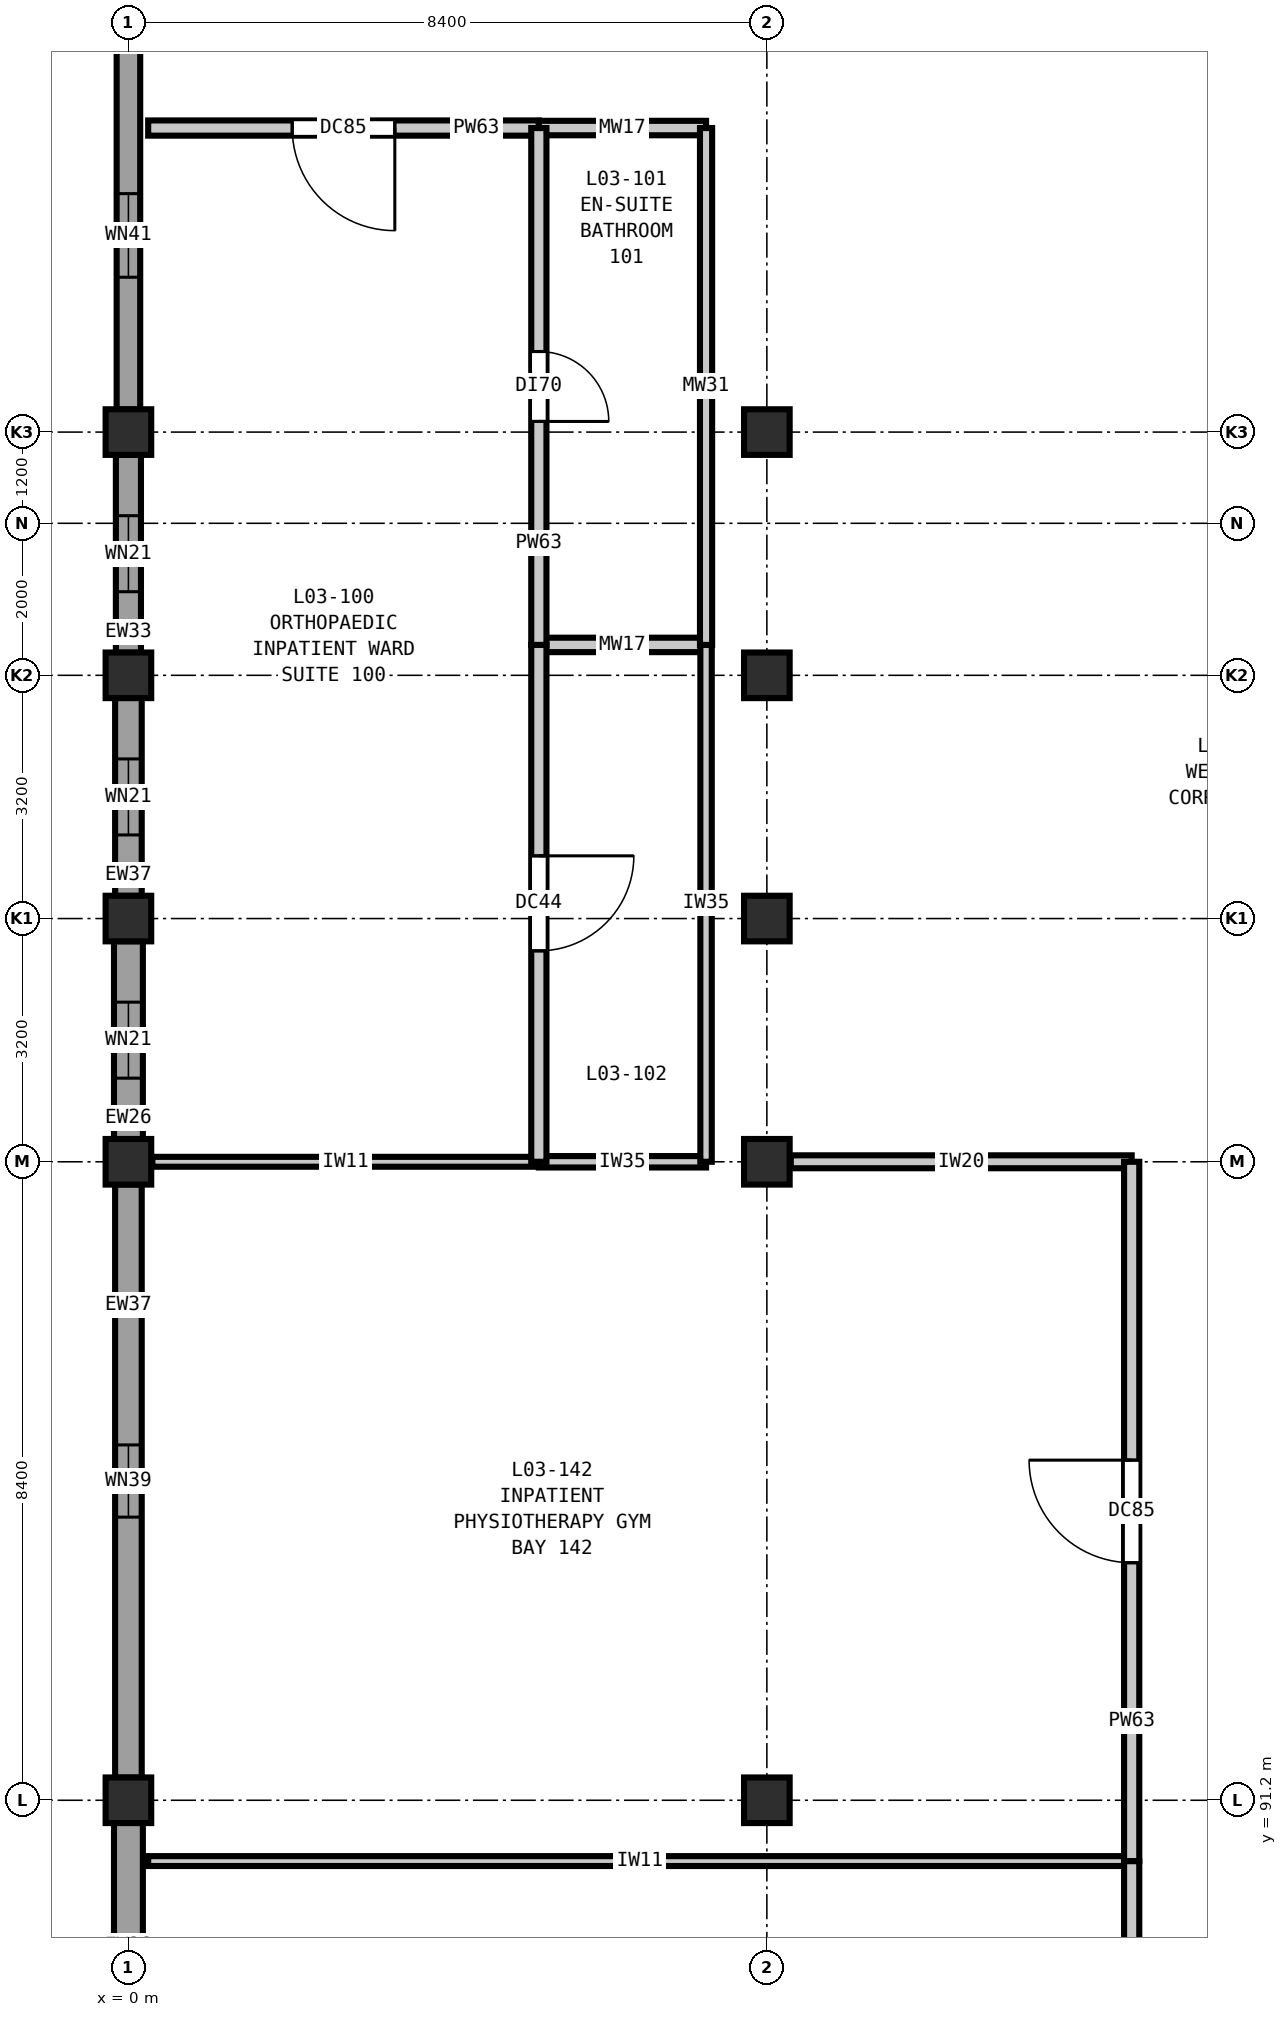
"""IFC4 building model, lengths in metres.
Left out: names, types, materials, properties, quantities, classifications, styles, units other than length and angle.
Written with IfcOpenShell. Run it as: python <this file> out.ifc"""

import sys

from ifc_helpers import new_model, si_unit, direction, frame, frame_2d, origin, origin_2d, place, context, subcontext, project, spatial, rectangle, extrude, element, fill, save


model = new_model("IFC4")
c1 = context("Model", 3, precision=1e-05, world=origin(), true_north=direction((0.0, 1.0)))
c2 = subcontext(c1, "Body", "Model", "MODEL_VIEW")
j1 = project(units=[si_unit("LENGTHUNIT", "METRE"), si_unit("PLANEANGLEUNIT", "RADIAN")], contexts=[c1])
p1 = place(None, origin())
s1 = spatial("IfcSite", under=j1, at=p1, CompositionType="ELEMENT")
p2 = place(p1, origin())
s2 = spatial("IfcBuilding", under=s1, at=p2, CompositionType="ELEMENT")
p3 = place(p2, frame((0.0, 0.0, 16.2)))
s3 = spatial("IfcBuildingStorey", under=s2, at=p3, CompositionType="ELEMENT", Elevation=16.2)
for number, where, z_axis, x_axis in (
    (1, (0.0, 91.2, 0.0), (0.0, 0.0, 1.0), (1.0, 0.0, 0.0)),
    (2, (0.0, 99.6, 0.0), (0.0, 0.0, 1.0), (1.0, 0.0, 0.0)),
    (3, (0.0, 102.8, 0.0), (0.0, 0.0, 1.0), (1.0, 0.0, 0.0)),
    (4, (0.0, 106.0, 0.0), (0.0, 0.0, 1.0), (1.0, 0.0, 0.0)),
    (5, (0.0, 109.2, 0.0), (0.0, 0.0, 1.0), (1.0, 0.0, 0.0)),
    (6, (8.4, 91.2, 0.0), (0.0, 0.0, 1.0), (1.0, 0.0, 0.0)),
    (7, (8.4, 99.6, 0.0), (0.0, 0.0, 1.0), (1.0, 0.0, 0.0)),
    (8, (8.4, 102.8, 0.0), (0.0, 0.0, 1.0), (1.0, 0.0, 0.0)),
    (9, (8.4, 106.0, 0.0), (0.0, 0.0, 1.0), (1.0, 0.0, 0.0)),
    (10, (8.4, 109.2, 0.0), (0.0, 0.0, 1.0), (1.0, 0.0, 0.0)),
):
    element("IfcColumn", number, at=place(p3, frame(where, z_axis=z_axis, x_axis=x_axis)), inside=s3, PredefinedType="COLUMN", context=c2, shape_type="SweptSolid", body=[
        extrude(rectangle(XDim=0.6, YDim=0.6, at=origin_2d()), origin(), (0.0, 0.0, 1.0), 4.2),
    ])
p4 = place(p3, frame((0.0, 99.898, 0.0), z_axis=(0.0, 0.0, 1.0), x_axis=(0.0, 1.0, 0.0)))
e11 = element("IfcWall", 11, at=p4, inside=s3, PredefinedType="SOLIDWALL", context=c2, shape_type="SweptSolid", body=[
    extrude(rectangle(XDim=2.604, YDim=0.38, at=frame_2d((1.302, 0.0))), origin(), (0.0, 0.0, 1.0), 3.48),
])
p5 = place(p4, frame((0.802, 0.0, 0.9)))
e12 = element("IfcOpeningElement", 12, at=p5, cuts=e11, PredefinedType="OPENING", context=c2, shape_type="SweptSolid", body=[
    extrude(rectangle(XDim=1.0, YDim=1.55, at=frame_2d((0.5, 0.775))), frame((0.0, 0.2, 0.0), z_axis=(0.0, -1.0, 0.0), x_axis=(1.0, 0.0, 0.0)), (0.0, 0.0, 1.0), 0.4),
])
p6 = place(p3, frame((0.0, 103.098, 0.0), z_axis=(0.0, 0.0, 1.0), x_axis=(0.0, 1.0, 0.0)))
e13 = element("IfcWall", 13, at=p6, inside=s3, PredefinedType="SOLIDWALL", context=c2, shape_type="SweptSolid", body=[
    extrude(rectangle(XDim=2.604, YDim=0.35, at=frame_2d((1.302, 0.0))), origin(), (0.0, 0.0, 1.0), 3.48),
])
p7 = place(p6, frame((0.802, 0.0, 0.9)))
e14 = element("IfcOpeningElement", 14, at=p7, cuts=e13, PredefinedType="OPENING", context=c2, shape_type="SweptSolid", body=[
    extrude(rectangle(XDim=1.0, YDim=1.55, at=frame_2d((0.5, 0.775))), frame((0.0, 0.185, 0.0), z_axis=(0.0, -1.0, 0.0), x_axis=(1.0, 0.0, 0.0)), (0.0, 0.0, 1.0), 0.37),
])
p8 = place(p3, frame((0.0, 106.298, 0.0), z_axis=(0.0, 0.0, 1.0), x_axis=(0.0, 1.0, 0.0)))
e15 = element("IfcWall", 15, at=p8, inside=s3, PredefinedType="SOLIDWALL", context=c2, shape_type="SweptSolid", body=[
    extrude(rectangle(XDim=2.604, YDim=0.33, at=frame_2d((1.302, 0.0))), origin(), (0.0, 0.0, 1.0), 3.48),
])
p9 = place(p8, frame((0.802, 0.0, 0.9)))
e16 = element("IfcOpeningElement", 16, at=p9, cuts=e15, PredefinedType="OPENING", context=c2, shape_type="SweptSolid", body=[
    extrude(rectangle(XDim=1.0, YDim=1.55, at=frame_2d((0.5, 0.775))), frame((0.0, 0.175, 0.0), z_axis=(0.0, -1.0, 0.0), x_axis=(1.0, 0.0, 0.0)), (0.0, 0.0, 1.0), 0.35),
])
p10 = place(p3, frame((0.0, 109.498, 0.0), z_axis=(0.0, 0.0, 1.0), x_axis=(0.0, 1.0, 0.0)))
e17 = element("IfcWall", 17, at=p10, inside=s3, PredefinedType="SOLIDWALL", context=c2, shape_type="SweptSolid", body=[
    extrude(rectangle(XDim=6.604, YDim=0.31, at=frame_2d((3.302, 0.0))), origin(), (0.0, 0.0, 1.0), 3.48),
])
p11 = place(p10, frame((1.739, 0.0, 0.9)))
e18 = element("IfcOpeningElement", 18, at=p11, cuts=e17, PredefinedType="OPENING", context=c2, shape_type="SweptSolid", body=[
    extrude(rectangle(XDim=1.1, YDim=1.95, at=frame_2d((0.55, 0.975))), frame((0.0, 0.165, 0.0), z_axis=(0.0, -1.0, 0.0), x_axis=(1.0, 0.0, 0.0)), (0.0, 0.0, 1.0), 0.33),
])
p12 = place(p3, frame((0.0, 83.073, 0.0), z_axis=(0.0, 0.0, 1.0), x_axis=(0.0, 1.0, 0.0)))
e19 = element("IfcWall", 19, at=p12, inside=s3, PredefinedType="SOLIDWALL", context=c2, shape_type="SweptSolid", body=[
    extrude(rectangle(XDim=7.829, YDim=0.38, at=frame_2d((3.915, 0.0))), origin(), (0.0, 0.0, 1.0), 3.48),
])
p13 = place(p12, frame((3.49, 0.0, 0.9)))
e20 = element("IfcOpeningElement", 20, at=p13, cuts=e19, PredefinedType="OPENING", context=c2, shape_type="SweptSolid", body=[
    extrude(rectangle(XDim=0.85, YDim=1.4, at=frame_2d((0.425, 0.7))), frame((0.0, 0.2, 0.0), z_axis=(0.0, -1.0, 0.0), x_axis=(1.0, 0.0, 0.0)), (0.0, 0.0, 1.0), 0.4),
])
p14 = place(p3, frame((0.0, 91.498, 0.0), z_axis=(0.0, 0.0, 1.0), x_axis=(0.0, 1.0, 0.0)))
e21 = element("IfcWall", 21, at=p14, inside=s3, PredefinedType="SOLIDWALL", context=c2, shape_type="SweptSolid", body=[
    extrude(rectangle(XDim=7.804, YDim=0.35, at=frame_2d((3.902, 0.0))), origin(), (0.0, 0.0, 1.0), 3.48),
])
p15 = place(p14, frame((3.427, 0.0, 0.9)))
e22 = element("IfcOpeningElement", 22, at=p15, cuts=e21, PredefinedType="OPENING", context=c2, shape_type="SweptSolid", body=[
    extrude(rectangle(XDim=0.95, YDim=1.4, at=frame_2d((0.475, 0.7))), frame((0.0, 0.185, 0.0), z_axis=(0.0, -1.0, 0.0), x_axis=(1.0, 0.0, 0.0)), (0.0, 0.0, 1.0), 0.37),
])
p16 = place(p3, frame((0.26, 90.4, 0.0), z_axis=(0.0, 0.0, 1.0), x_axis=(1.0, 0.0, 0.0)))
e23 = element("IfcWall", 23, at=p16, inside=s3, PredefinedType="PARTITIONING", context=c2, shape_type="SweptSolid", body=[
    extrude(rectangle(XDim=12.94, YDim=0.13, at=frame_2d((6.47, 0.0))), origin(), (0.0, 0.0, 1.0), 3.89),
])
p17 = place(p3, frame((0.315, 99.6, 0.0), z_axis=(0.0, 0.0, 1.0), x_axis=(1.0, 0.0, 0.0)))
e24 = element("IfcWall", 24, at=p17, inside=s3, PredefinedType="PARTITIONING", context=c2, shape_type="SweptSolid", body=[
    extrude(rectangle(XDim=5.085, YDim=0.13, at=frame_2d((2.542, 0.0))), origin(), (0.0, 0.0, 1.0), 3.535),
])
p18 = place(p3, frame((5.4, 99.6, 0.0), z_axis=(0.0, 0.0, 1.0), x_axis=(1.0, 0.0, 0.0)))
e25 = element("IfcWall", 25, at=p18, inside=s3, PredefinedType="PARTITIONING", context=c2, shape_type="SweptSolid", body=[
    extrude(rectangle(XDim=2.2, YDim=0.15, at=frame_2d((1.1, 0.0))), origin(), (0.0, 0.0, 1.0), 3.535),
])
p19 = place(p3, frame((8.715, 99.6, 0.0), z_axis=(0.0, 0.0, 1.0), x_axis=(1.0, 0.0, 0.0)))
e26 = element("IfcWall", 26, at=p19, inside=s3, PredefinedType="PARTITIONING", context=c2, shape_type="SweptSolid", body=[
    extrude(rectangle(XDim=4.485, YDim=0.17, at=frame_2d((2.242, 0.0))), origin(), (0.0, 0.0, 1.0), 3.535),
])
p20 = place(p3, frame((5.4, 106.4, 0.0), z_axis=(0.0, 0.0, 1.0), x_axis=(1.0, 0.0, 0.0)))
e27 = element("IfcWall", 27, at=p20, inside=s3, PredefinedType="PLUMBINGWALL", context=c2, shape_type="SweptSolid", body=[
    extrude(rectangle(XDim=2.2, YDim=0.19, at=frame_2d((1.1, 0.0))), origin(), (0.0, 0.0, 1.0), 3.89),
])
p21 = place(p3, frame((0.26, 113.2, 0.0), z_axis=(0.0, 0.0, 1.0), x_axis=(1.0, 0.0, 0.0)))
e28 = element("IfcWall", 28, at=p21, inside=s3, PredefinedType="PARTITIONING", context=c2, shape_type="SweptSolid", body=[
    extrude(rectangle(XDim=5.14, YDim=0.2, at=frame_2d((2.57, 0.0))), origin(), (0.0, 0.0, 1.0), 3.89),
])
p22 = place(p21, frame((1.895, 0.0, 0.0)))
e29 = element("IfcOpeningElement", 29, at=p22, cuts=e28, PredefinedType="OPENING", context=c2, shape_type="SweptSolid", body=[
    extrude(rectangle(XDim=1.35, YDim=2.2, at=frame_2d((0.675, 1.1))), frame((0.0, 0.11, 0.0), z_axis=(0.0, -1.0, 0.0), x_axis=(1.0, 0.0, 0.0)), (0.0, 0.0, 1.0), 0.22),
])
p23 = place(p3, frame((5.4, 113.2, 0.0), z_axis=(0.0, 0.0, 1.0), x_axis=(1.0, 0.0, 0.0)))
e30 = element("IfcWall", 30, at=p23, inside=s3, PredefinedType="PLUMBINGWALL", context=c2, shape_type="SweptSolid", body=[
    extrude(rectangle(XDim=2.2, YDim=0.19, at=frame_2d((1.1, 0.0))), origin(), (0.0, 0.0, 1.0), 3.89),
])
p24 = place(p3, frame((5.4, 99.6, 0.0), z_axis=(0.0, 0.0, 1.0), x_axis=(0.0, 1.0, 0.0)))
e31 = element("IfcWall", 31, at=p24, inside=s3, PredefinedType="PARTITIONING", context=c2, shape_type="SweptSolid", body=[
    extrude(rectangle(XDim=6.8, YDim=0.2, at=frame_2d((3.4, 0.0))), origin(), (0.0, 0.0, 1.0), 3.89),
])
p25 = place(p24, frame((2.775, 0.0, 0.0)))
e32 = element("IfcOpeningElement", 32, at=p25, cuts=e31, PredefinedType="OPENING", context=c2, shape_type="SweptSolid", body=[
    extrude(rectangle(XDim=1.25, YDim=2.15, at=frame_2d((0.625, 1.075))), frame((0.0, 0.11, 0.0), z_axis=(0.0, -1.0, 0.0), x_axis=(1.0, 0.0, 0.0)), (0.0, 0.0, 1.0), 0.22),
])
p26 = place(p3, frame((5.4, 106.4, 0.0), z_axis=(0.0, 0.0, 1.0), x_axis=(0.0, 1.0, 0.0)))
e33 = element("IfcWall", 33, at=p26, inside=s3, PredefinedType="PARTITIONING", context=c2, shape_type="SweptSolid", body=[
    extrude(rectangle(XDim=6.8, YDim=0.2, at=frame_2d((3.4, 0.0))), origin(), (0.0, 0.0, 1.0), 3.89),
])
p27 = place(p26, frame((2.94, 0.0, 0.0)))
e34 = element("IfcOpeningElement", 34, at=p27, cuts=e33, PredefinedType="OPENING", context=c2, shape_type="SweptSolid", body=[
    extrude(rectangle(XDim=0.92, YDim=2.1, at=frame_2d((0.46, 1.05))), frame((0.0, 0.11, 0.0), z_axis=(0.0, -1.0, 0.0), x_axis=(1.0, 0.0, 0.0)), (0.0, 0.0, 1.0), 0.22),
])
p28 = place(p3, frame((7.6, 99.6, 0.0), z_axis=(0.0, 0.0, 1.0), x_axis=(0.0, 1.0, 0.0)))
e35 = element("IfcWall", 35, at=p28, inside=s3, PredefinedType="PARTITIONING", context=c2, shape_type="SweptSolid", body=[
    extrude(rectangle(XDim=6.8, YDim=0.15, at=frame_2d((3.4, 0.0))), origin(), (0.0, 0.0, 1.0), 3.89),
])
p29 = place(p3, frame((7.6, 106.4, 0.0), z_axis=(0.0, 0.0, 1.0), x_axis=(0.0, 1.0, 0.0)))
e36 = element("IfcWall", 36, at=p29, inside=s3, PredefinedType="PLUMBINGWALL", context=c2, shape_type="SweptSolid", body=[
    extrude(rectangle(XDim=6.8, YDim=0.16, at=frame_2d((3.4, 0.0))), origin(), (0.0, 0.0, 1.0), 3.89),
])
p30 = place(p3, frame((13.2, 82.8, 0.0), z_axis=(0.0, 0.0, 1.0), x_axis=(0.0, 1.0, 0.0)))
e37 = element("IfcWall", 37, at=p30, inside=s3, PredefinedType="PARTITIONING", context=c2, shape_type="SweptSolid", body=[
    extrude(rectangle(XDim=7.6, YDim=0.2, at=frame_2d((3.8, 0.0))), origin(), (0.0, 0.0, 1.0), 3.89),
])
p31 = place(p30, frame((3.15, 0.0, 0.0)))
e38 = element("IfcOpeningElement", 38, at=p31, cuts=e37, PredefinedType="OPENING", context=c2, shape_type="SweptSolid", body=[
    extrude(rectangle(XDim=1.3, YDim=2.2, at=frame_2d((0.65, 1.1))), frame((0.0, 0.11, 0.0), z_axis=(0.0, -1.0, 0.0), x_axis=(1.0, 0.0, 0.0)), (0.0, 0.0, 1.0), 0.22),
])
p32 = place(p3, frame((13.2, 90.4, 0.0), z_axis=(0.0, 0.0, 1.0), x_axis=(0.0, 1.0, 0.0)))
e39 = element("IfcWall", 39, at=p32, inside=s3, PredefinedType="PARTITIONING", context=c2, shape_type="SweptSolid", body=[
    extrude(rectangle(XDim=9.2, YDim=0.2, at=frame_2d((4.6, 0.0))), origin(), (0.0, 0.0, 1.0), 3.89),
])
p33 = place(p32, frame((3.925, 0.0, 0.0)))
e40 = element("IfcOpeningElement", 40, at=p33, cuts=e39, PredefinedType="OPENING", context=c2, shape_type="SweptSolid", body=[
    extrude(rectangle(XDim=1.35, YDim=2.2, at=frame_2d((0.675, 1.1))), frame((0.0, 0.11, 0.0), z_axis=(0.0, -1.0, 0.0), x_axis=(1.0, 0.0, 0.0)), (0.0, 0.0, 1.0), 0.22),
])
p34 = place(p5, origin())
e41 = element("IfcWindow", 41, at=p34, inside=s3, PartitioningType="SINGLE_PANEL", PredefinedType="WINDOW", context=c2, shape_type="SweptSolid", body=[
    extrude(rectangle(XDim=1.0, YDim=1.55, at=frame_2d((0.5, 0.775))), frame((0.0, 0.03, 0.0), z_axis=(0.0, -1.0, 0.0), x_axis=(1.0, 0.0, 0.0)), (0.0, 0.0, 1.0), 0.06),
])
fill(e12, e41)
p35 = place(p7, origin())
e42 = element("IfcWindow", 42, at=p35, inside=s3, PartitioningType="SINGLE_PANEL", PredefinedType="WINDOW", context=c2, shape_type="SweptSolid", body=[
    extrude(rectangle(XDim=1.0, YDim=1.55, at=frame_2d((0.5, 0.775))), frame((0.0, 0.03, 0.0), z_axis=(0.0, -1.0, 0.0), x_axis=(1.0, 0.0, 0.0)), (0.0, 0.0, 1.0), 0.06),
])
fill(e14, e42)
p36 = place(p9, origin())
e43 = element("IfcWindow", 43, at=p36, inside=s3, PartitioningType="SINGLE_PANEL", PredefinedType="WINDOW", context=c2, shape_type="SweptSolid", body=[
    extrude(rectangle(XDim=1.0, YDim=1.55, at=frame_2d((0.5, 0.775))), frame((0.0, 0.03, 0.0), z_axis=(0.0, -1.0, 0.0), x_axis=(1.0, 0.0, 0.0)), (0.0, 0.0, 1.0), 0.06),
])
fill(e16, e43)
p37 = place(p11, origin())
e44 = element("IfcWindow", 44, at=p37, inside=s3, PartitioningType="SINGLE_PANEL", PredefinedType="WINDOW", context=c2, shape_type="SweptSolid", body=[
    extrude(rectangle(XDim=1.1, YDim=1.95, at=frame_2d((0.55, 0.975))), frame((0.0, 0.03, 0.0), z_axis=(0.0, -1.0, 0.0), x_axis=(1.0, 0.0, 0.0)), (0.0, 0.0, 1.0), 0.06),
])
fill(e18, e44)
p38 = place(p15, origin())
e45 = element("IfcWindow", 45, at=p38, inside=s3, PartitioningType="SINGLE_PANEL", PredefinedType="WINDOW", context=c2, shape_type="SweptSolid", body=[
    extrude(rectangle(XDim=0.95, YDim=1.4, at=frame_2d((0.475, 0.7))), frame((0.0, 0.03, 0.0), z_axis=(0.0, -1.0, 0.0), x_axis=(1.0, 0.0, 0.0)), (0.0, 0.0, 1.0), 0.06),
])
fill(e22, e45)
p39 = place(p22, frame((1.35, 0.0, 0.0), z_axis=(0.0, 0.0, 1.0), x_axis=(-1.0, 0.0, 0.0)))
e46 = element("IfcDoor", 46, at=p39, inside=s3, OperationType="SINGLE_SWING_LEFT", PredefinedType="DOOR", context=c2, shape_type="SweptSolid", body=[
    extrude(rectangle(XDim=1.35, YDim=2.2, at=frame_2d((0.675, 1.1))), frame((0.0, 0.025, 0.0), z_axis=(0.0, -1.0, 0.0), x_axis=(1.0, 0.0, 0.0)), (0.0, 0.0, 1.0), 0.05),
])
fill(e29, e46)
p40 = place(p25, frame((1.25, 0.0, 0.0), z_axis=(0.0, 0.0, 1.0), x_axis=(-1.0, 0.0, 0.0)))
e47 = element("IfcDoor", 47, at=p40, inside=s3, OperationType="SINGLE_SWING_LEFT", PredefinedType="DOOR", context=c2, shape_type="SweptSolid", body=[
    extrude(rectangle(XDim=1.25, YDim=2.15, at=frame_2d((0.625, 1.075))), frame((0.0, 0.025, 0.0), z_axis=(0.0, -1.0, 0.0), x_axis=(1.0, 0.0, 0.0)), (0.0, 0.0, 1.0), 0.05),
])
fill(e32, e47)
p41 = place(p27, frame((0.92, 0.0, 0.0), z_axis=(0.0, 0.0, 1.0), x_axis=(-1.0, 0.0, 0.0)))
e48 = element("IfcDoor", 48, at=p41, inside=s3, OperationType="SINGLE_SWING_RIGHT", PredefinedType="DOOR", context=c2, shape_type="SweptSolid", body=[
    extrude(rectangle(XDim=0.92, YDim=2.1, at=frame_2d((0.46, 1.05))), frame((0.0, 0.025, 0.0), z_axis=(0.0, -1.0, 0.0), x_axis=(1.0, 0.0, 0.0)), (0.0, 0.0, 1.0), 0.05),
])
fill(e34, e48)
p42 = place(p33, origin())
e49 = element("IfcDoor", 49, at=p42, inside=s3, OperationType="SINGLE_SWING_RIGHT", PredefinedType="DOOR", context=c2, shape_type="SweptSolid", body=[
    extrude(rectangle(XDim=1.35, YDim=2.2, at=frame_2d((0.675, 1.1))), frame((0.0, 0.025, 0.0), z_axis=(0.0, -1.0, 0.0), x_axis=(1.0, 0.0, 0.0)), (0.0, 0.0, 1.0), 0.05),
])
fill(e40, e49)
save(model, sys.argv[1])
